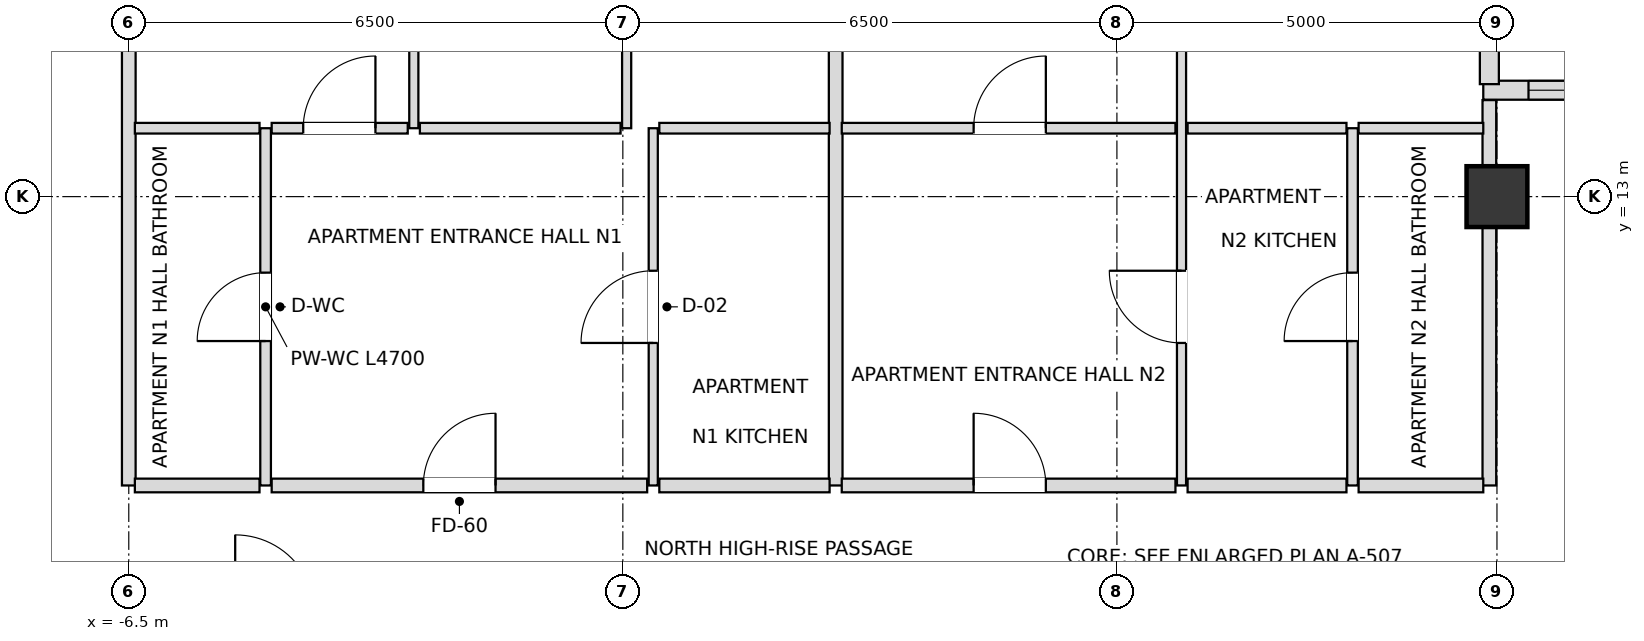
"""IFC4 building model, lengths in metres.
Left out: names, types, materials, properties, quantities, classifications, styles, units other than length and angle.
Written with IfcOpenShell. Run it as: python <this file> out.ifc"""

import sys

from ifc_helpers import new_model, si_unit, direction, frame, frame_2d, origin, origin_2d, place, context, subcontext, project, spatial, rectangle, extrude, element, fill, save


model = new_model("IFC4")
c1 = context("Model", 3, precision=1e-05, world=origin(), true_north=direction((0.0, 1.0)))
c2 = subcontext(c1, "Body", "Model", "MODEL_VIEW")
j1 = project(units=[si_unit("LENGTHUNIT", "METRE"), si_unit("PLANEANGLEUNIT", "RADIAN")], contexts=[c1])
p1 = place(None, origin())
s1 = spatial("IfcSite", under=j1, at=p1, CompositionType="ELEMENT")
p2 = place(p1, origin())
s2 = spatial("IfcBuilding", under=s1, at=p2, CompositionType="ELEMENT")
p3 = place(p2, frame((0.0, 0.0, 236.7)))
s3 = spatial("IfcBuildingStorey", under=s2, at=p3, CompositionType="ELEMENT", Elevation=236.7)
p4 = place(p3, frame((11.5, 13.0, 0.0), z_axis=(0.0, 0.0, 1.0), x_axis=(1.0, 0.0, 0.0)))
e1 = element("IfcColumn", 1, at=p4, inside=s3, PredefinedType="COLUMN", context=c2, shape_type="SweptSolid", body=[
    extrude(rectangle(XDim=0.8, YDim=0.8, at=origin_2d()), origin(), (0.0, 0.0, 1.0), 3.6),
])
p5 = place(p3, frame((16.98, 14.4, 0.0), z_axis=(0.0, 0.0, 1.0), x_axis=(-1.0, 0.0, 0.0)))
e2 = element("IfcWall", 2, at=p5, inside=s3, PredefinedType="SOLIDWALL", context=c2, shape_type="SweptSolid", body=[
    extrude(rectangle(XDim=5.66, YDim=0.25, at=frame_2d((2.83, 0.0))), origin(), (0.0, 0.0, 1.0), 2.748),
])
p6 = place(p5, frame((0.595, 0.0, 0.72)))
e3 = element("IfcOpeningElement", 3, at=p6, cuts=e2, PredefinedType="OPENING", context=c2, shape_type="SweptSolid", body=[
    extrude(rectangle(XDim=1.8, YDim=1.68, at=frame_2d((0.9, 0.84))), frame((0.0, 0.135, 0.0), z_axis=(0.0, -1.0, 0.0), x_axis=(1.0, 0.0, 0.0)), (0.0, 0.0, 1.0), 0.27),
])
p7 = place(p5, frame((3.265, 0.0, 0.72)))
e4 = element("IfcOpeningElement", 4, at=p7, cuts=e2, PredefinedType="OPENING", context=c2, shape_type="SweptSolid", body=[
    extrude(rectangle(XDim=1.8, YDim=1.68, at=frame_2d((0.9, 0.84))), frame((0.0, 0.135, 0.0), z_axis=(0.0, -1.0, 0.0), x_axis=(1.0, 0.0, 0.0)), (0.0, 0.0, 1.0), 0.27),
])
p8 = place(p3, frame((11.4, 14.48, 0.0), z_axis=(0.0, 0.0, 1.0), x_axis=(0.0, 1.0, 0.0)))
e5 = element("IfcWall", 5, at=p8, inside=s3, PredefinedType="SOLIDWALL", context=c2, shape_type="SweptSolid", body=[
    extrude(rectangle(XDim=5.34, YDim=0.25, at=frame_2d((2.67, 0.0))), origin(), (0.0, 0.0, 1.0), 2.748),
])
p9 = place(p8, frame((1.615, 0.0, 0.72)))
e6 = element("IfcOpeningElement", 6, at=p9, cuts=e5, PredefinedType="OPENING", context=c2, shape_type="SweptSolid", body=[
    extrude(rectangle(XDim=1.8, YDim=1.68, at=frame_2d((0.9, 0.84))), frame((0.0, 0.135, 0.0), z_axis=(0.0, -1.0, 0.0), x_axis=(1.0, 0.0, 0.0)), (0.0, 0.0, 1.0), 0.27),
])
p10 = place(p3, frame((-6.5, 9.2, 0.0), z_axis=(0.0, 0.0, 1.0), x_axis=(0.0, 1.0, 0.0)))
e7 = element("IfcWall", 7, at=p10, inside=s3, PredefinedType="PARTITIONING", context=c2, shape_type="SweptSolid", body=[
    extrude(rectangle(XDim=10.7, YDim=0.18, at=frame_2d((5.35, 0.0))), origin(), (0.0, 0.0, 1.0), 2.826),
])
p11 = place(p3, frame((-4.7, 9.2, 0.0), z_axis=(0.0, 0.0, 1.0), x_axis=(0.0, 1.0, 0.0)))
e8 = element("IfcWall", 8, at=p11, inside=s3, PredefinedType="PARTITIONING", context=c2, shape_type="SweptSolid", body=[
    extrude(rectangle(XDim=4.7, YDim=0.14, at=frame_2d((2.35, 0.0))), origin(), (0.0, 0.0, 1.0), 3.38),
])
p12 = place(p11, frame((1.9, 0.0, 0.0)))
e9 = element("IfcOpeningElement", 9, at=p12, cuts=e8, PredefinedType="OPENING", context=c2, shape_type="SweptSolid", body=[
    extrude(rectangle(XDim=0.9, YDim=2.1, at=frame_2d((0.45, 1.05))), frame((0.0, 0.08, 0.0), z_axis=(0.0, -1.0, 0.0), x_axis=(1.0, 0.0, 0.0)), (0.0, 0.0, 1.0), 0.16),
])
p13 = place(p3, frame((-2.75, 13.9, 0.0), z_axis=(0.0, 0.0, 1.0), x_axis=(0.0, 1.0, 0.0)))
e10 = element("IfcWall", 10, at=p13, inside=s3, PredefinedType="PARTITIONING", context=c2, shape_type="SweptSolid", body=[
    extrude(rectangle(XDim=6.0, YDim=0.12, at=frame_2d((3.0, 0.0))), origin(), (0.0, 0.0, 1.0), 3.018),
])
p14 = place(p13, frame((2.55, 0.0, 0.0)))
e11 = element("IfcOpeningElement", 11, at=p14, cuts=e10, PredefinedType="OPENING", context=c2, shape_type="SweptSolid", body=[
    extrude(rectangle(XDim=0.9, YDim=2.1, at=frame_2d((0.45, 1.05))), frame((0.0, 0.07, 0.0), z_axis=(0.0, -1.0, 0.0), x_axis=(1.0, 0.0, 0.0)), (0.0, 0.0, 1.0), 0.14),
])
p15 = place(p3, frame((0.05, 13.9, 0.0), z_axis=(0.0, 0.0, 1.0), x_axis=(0.0, 1.0, 0.0)))
e12 = element("IfcWall", 12, at=p15, inside=s3, PredefinedType="PARTITIONING", context=c2, shape_type="SweptSolid", body=[
    extrude(rectangle(XDim=6.0, YDim=0.12, at=frame_2d((3.0, 0.0))), origin(), (0.0, 0.0, 1.0), 3.018),
])
p16 = place(p15, frame((2.55, 0.0, 0.0)))
e13 = element("IfcOpeningElement", 13, at=p16, cuts=e12, PredefinedType="OPENING", context=c2, shape_type="SweptSolid", body=[
    extrude(rectangle(XDim=0.9, YDim=2.1, at=frame_2d((0.45, 1.05))), frame((0.0, 0.07, 0.0), z_axis=(0.0, -1.0, 0.0), x_axis=(1.0, 0.0, 0.0)), (0.0, 0.0, 1.0), 0.14),
])
p17 = place(p3, frame((0.4, 9.2, 0.0), z_axis=(0.0, 0.0, 1.0), x_axis=(0.0, 1.0, 0.0)))
e14 = element("IfcWall", 14, at=p17, inside=s3, PredefinedType="PARTITIONING", context=c2, shape_type="SweptSolid", body=[
    extrude(rectangle(XDim=4.7, YDim=0.12, at=frame_2d((2.35, 0.0))), origin(), (0.0, 0.0, 1.0), 3.38),
])
p18 = place(p17, frame((1.875, 0.0, 0.0)))
e15 = element("IfcOpeningElement", 15, at=p18, cuts=e14, PredefinedType="OPENING", context=c2, shape_type="SweptSolid", body=[
    extrude(rectangle(XDim=0.95, YDim=2.1, at=frame_2d((0.475, 1.05))), frame((0.0, 0.07, 0.0), z_axis=(0.0, -1.0, 0.0), x_axis=(1.0, 0.0, 0.0)), (0.0, 0.0, 1.0), 0.14),
])
p19 = place(p3, frame((2.8, 9.2, 0.0), z_axis=(0.0, 0.0, 1.0), x_axis=(0.0, 1.0, 0.0)))
e16 = element("IfcWall", 16, at=p19, inside=s3, PredefinedType="PARTITIONING", context=c2, shape_type="SweptSolid", body=[
    extrude(rectangle(XDim=10.7, YDim=0.18, at=frame_2d((5.35, 0.0))), origin(), (0.0, 0.0, 1.0), 3.018),
])
p20 = place(p3, frame((7.35, 9.2, 0.0), z_axis=(0.0, 0.0, 1.0), x_axis=(0.0, 1.0, 0.0)))
e17 = element("IfcWall", 17, at=p20, inside=s3, PredefinedType="PARTITIONING", context=c2, shape_type="SweptSolid", body=[
    extrude(rectangle(XDim=10.7, YDim=0.12, at=frame_2d((5.35, 0.0))), origin(), (0.0, 0.0, 1.0), 2.826),
])
p21 = place(p20, frame((1.875, 0.0, 0.0)))
e18 = element("IfcOpeningElement", 18, at=p21, cuts=e17, PredefinedType="OPENING", context=c2, shape_type="SweptSolid", body=[
    extrude(rectangle(XDim=0.95, YDim=2.1, at=frame_2d((0.475, 1.05))), frame((0.0, 0.07, 0.0), z_axis=(0.0, -1.0, 0.0), x_axis=(1.0, 0.0, 0.0)), (0.0, 0.0, 1.0), 0.14),
])
p22 = place(p20, frame((7.25, 0.0, 0.0)))
e19 = element("IfcOpeningElement", 19, at=p22, cuts=e17, PredefinedType="OPENING", context=c2, shape_type="SweptSolid", body=[
    extrude(rectangle(XDim=0.9, YDim=2.1, at=frame_2d((0.45, 1.05))), frame((0.0, 0.07, 0.0), z_axis=(0.0, -1.0, 0.0), x_axis=(1.0, 0.0, 0.0)), (0.0, 0.0, 1.0), 0.14),
])
p23 = place(p3, frame((9.6, 9.2, 0.0), z_axis=(0.0, 0.0, 1.0), x_axis=(0.0, 1.0, 0.0)))
e20 = element("IfcWall", 20, at=p23, inside=s3, PredefinedType="PARTITIONING", context=c2, shape_type="SweptSolid", body=[
    extrude(rectangle(XDim=4.7, YDim=0.14, at=frame_2d((2.35, 0.0))), origin(), (0.0, 0.0, 1.0), 2.826),
])
p24 = place(p23, frame((1.9, 0.0, 0.0)))
e21 = element("IfcOpeningElement", 21, at=p24, cuts=e20, PredefinedType="OPENING", context=c2, shape_type="SweptSolid", body=[
    extrude(rectangle(XDim=0.9, YDim=2.1, at=frame_2d((0.45, 1.05))), frame((0.0, 0.08, 0.0), z_axis=(0.0, -1.0, 0.0), x_axis=(1.0, 0.0, 0.0)), (0.0, 0.0, 1.0), 0.16),
])
p25 = place(p3, frame((11.4, 9.2, 0.0), z_axis=(0.0, 0.0, 1.0), x_axis=(0.0, 1.0, 0.0)))
e22 = element("IfcWall", 22, at=p25, inside=s3, PredefinedType="PARTITIONING", context=c2, shape_type="SweptSolid", body=[
    extrude(rectangle(XDim=5.07, YDim=0.18, at=frame_2d((2.535, 0.0))), origin(), (0.0, 0.0, 1.0), 2.748),
])
p26 = place(p3, frame((-6.42, 9.2, 0.0), z_axis=(0.0, 0.0, 1.0), x_axis=(1.0, 0.0, 0.0)))
e23 = element("IfcWall", 23, at=p26, inside=s3, PredefinedType="PARTITIONING", context=c2, shape_type="SweptSolid", body=[
    extrude(rectangle(XDim=1.64, YDim=0.18, at=frame_2d((0.82, 0.0))), origin(), (0.0, 0.0, 1.0), 3.38),
])
p27 = place(p3, frame((-4.62, 9.2, 0.0), z_axis=(0.0, 0.0, 1.0), x_axis=(1.0, 0.0, 0.0)))
e24 = element("IfcWall", 24, at=p27, inside=s3, PredefinedType="PARTITIONING", context=c2, shape_type="SweptSolid", body=[
    extrude(rectangle(XDim=4.94, YDim=0.18, at=frame_2d((2.47, 0.0))), origin(), (0.0, 0.0, 1.0), 3.38),
])
p28 = place(p27, frame((1.995, 0.0, 0.0)))
e25 = element("IfcOpeningElement", 25, at=p28, cuts=e24, PredefinedType="OPENING", context=c2, shape_type="SweptSolid", body=[
    extrude(rectangle(XDim=0.95, YDim=2.15, at=frame_2d((0.475, 1.075))), frame((0.0, 0.1, 0.0), z_axis=(0.0, -1.0, 0.0), x_axis=(1.0, 0.0, 0.0)), (0.0, 0.0, 1.0), 0.2),
])
p29 = place(p3, frame((0.48, 9.2, 0.0), z_axis=(0.0, 0.0, 1.0), x_axis=(1.0, 0.0, 0.0)))
e26 = element("IfcWall", 26, at=p29, inside=s3, PredefinedType="PARTITIONING", context=c2, shape_type="SweptSolid", body=[
    extrude(rectangle(XDim=2.24, YDim=0.18, at=frame_2d((1.12, 0.0))), origin(), (0.0, 0.0, 1.0), 3.38),
])
p30 = place(p3, frame((2.88, 9.2, 0.0), z_axis=(0.0, 0.0, 1.0), x_axis=(1.0, 0.0, 0.0)))
e27 = element("IfcWall", 27, at=p30, inside=s3, PredefinedType="PARTITIONING", context=c2, shape_type="SweptSolid", body=[
    extrude(rectangle(XDim=4.39, YDim=0.18, at=frame_2d((2.195, 0.0))), origin(), (0.0, 0.0, 1.0), 2.826),
])
p31 = place(p30, frame((1.735, 0.0, 0.0)))
e28 = element("IfcOpeningElement", 28, at=p31, cuts=e27, PredefinedType="OPENING", context=c2, shape_type="SweptSolid", body=[
    extrude(rectangle(XDim=0.95, YDim=2.15, at=frame_2d((0.475, 1.075))), frame((0.0, 0.1, 0.0), z_axis=(0.0, -1.0, 0.0), x_axis=(1.0, 0.0, 0.0)), (0.0, 0.0, 1.0), 0.2),
])
p32 = place(p3, frame((7.43, 9.2, 0.0), z_axis=(0.0, 0.0, 1.0), x_axis=(1.0, 0.0, 0.0)))
e29 = element("IfcWall", 29, at=p32, inside=s3, PredefinedType="PARTITIONING", context=c2, shape_type="SweptSolid", body=[
    extrude(rectangle(XDim=2.09, YDim=0.18, at=frame_2d((1.045, 0.0))), origin(), (0.0, 0.0, 1.0), 3.38),
])
p33 = place(p3, frame((9.68, 9.2, 0.0), z_axis=(0.0, 0.0, 1.0), x_axis=(1.0, 0.0, 0.0)))
e30 = element("IfcWall", 30, at=p33, inside=s3, PredefinedType="PARTITIONING", context=c2, shape_type="SweptSolid", body=[
    extrude(rectangle(XDim=1.64, YDim=0.18, at=frame_2d((0.82, 0.0))), origin(), (0.0, 0.0, 1.0), 3.38),
])
p34 = place(p3, frame((-6.42, 13.9, 0.0), z_axis=(0.0, 0.0, 1.0), x_axis=(1.0, 0.0, 0.0)))
e31 = element("IfcWall", 31, at=p34, inside=s3, PredefinedType="PARTITIONING", context=c2, shape_type="SweptSolid", body=[
    extrude(rectangle(XDim=1.64, YDim=0.14, at=frame_2d((0.82, 0.0))), origin(), (0.0, 0.0, 1.0), 3.38),
])
p35 = place(p3, frame((-4.62, 13.9, 0.0), z_axis=(0.0, 0.0, 1.0), x_axis=(1.0, 0.0, 0.0)))
e32 = element("IfcWall", 32, at=p35, inside=s3, PredefinedType="PARTITIONING", context=c2, shape_type="SweptSolid", body=[
    extrude(rectangle(XDim=1.79, YDim=0.14, at=frame_2d((0.895, 0.0))), origin(), (0.0, 0.0, 1.0), 3.38),
])
p36 = place(p35, frame((0.415, 0.0, 0.0)))
e33 = element("IfcOpeningElement", 33, at=p36, cuts=e32, PredefinedType="OPENING", context=c2, shape_type="SweptSolid", body=[
    extrude(rectangle(XDim=0.95, YDim=2.1, at=frame_2d((0.475, 1.05))), frame((0.0, 0.08, 0.0), z_axis=(0.0, -1.0, 0.0), x_axis=(1.0, 0.0, 0.0)), (0.0, 0.0, 1.0), 0.16),
])
p37 = place(p3, frame((-2.67, 13.9, 0.0), z_axis=(0.0, 0.0, 1.0), x_axis=(1.0, 0.0, 0.0)))
e34 = element("IfcWall", 34, at=p37, inside=s3, PredefinedType="PARTITIONING", context=c2, shape_type="SweptSolid", body=[
    extrude(rectangle(XDim=2.64, YDim=0.14, at=frame_2d((1.32, 0.0))), origin(), (0.0, 0.0, 1.0), 3.38),
])
p38 = place(p3, frame((0.48, 13.9, 0.0), z_axis=(0.0, 0.0, 1.0), x_axis=(1.0, 0.0, 0.0)))
e35 = element("IfcWall", 35, at=p38, inside=s3, PredefinedType="PARTITIONING", context=c2, shape_type="SweptSolid", body=[
    extrude(rectangle(XDim=2.24, YDim=0.14, at=frame_2d((1.12, 0.0))), origin(), (0.0, 0.0, 1.0), 3.38),
])
p39 = place(p3, frame((2.88, 13.9, 0.0), z_axis=(0.0, 0.0, 1.0), x_axis=(1.0, 0.0, 0.0)))
e36 = element("IfcWall", 36, at=p39, inside=s3, PredefinedType="PARTITIONING", context=c2, shape_type="SweptSolid", body=[
    extrude(rectangle(XDim=4.39, YDim=0.14, at=frame_2d((2.195, 0.0))), origin(), (0.0, 0.0, 1.0), 2.826),
])
p40 = place(p39, frame((1.735, 0.0, 0.0)))
e37 = element("IfcOpeningElement", 37, at=p40, cuts=e36, PredefinedType="OPENING", context=c2, shape_type="SweptSolid", body=[
    extrude(rectangle(XDim=0.95, YDim=2.1, at=frame_2d((0.475, 1.05))), frame((0.0, 0.08, 0.0), z_axis=(0.0, -1.0, 0.0), x_axis=(1.0, 0.0, 0.0)), (0.0, 0.0, 1.0), 0.16),
])
p41 = place(p3, frame((7.43, 13.9, 0.0), z_axis=(0.0, 0.0, 1.0), x_axis=(1.0, 0.0, 0.0)))
e38 = element("IfcWall", 38, at=p41, inside=s3, PredefinedType="PARTITIONING", context=c2, shape_type="SweptSolid", body=[
    extrude(rectangle(XDim=2.09, YDim=0.14, at=frame_2d((1.045, 0.0))), origin(), (0.0, 0.0, 1.0), 3.38),
])
p42 = place(p3, frame((9.68, 13.9, 0.0), z_axis=(0.0, 0.0, 1.0), x_axis=(1.0, 0.0, 0.0)))
e39 = element("IfcWall", 39, at=p42, inside=s3, PredefinedType="PARTITIONING", context=c2, shape_type="SweptSolid", body=[
    extrude(rectangle(XDim=1.64, YDim=0.14, at=frame_2d((0.82, 0.0))), origin(), (0.0, 0.0, 1.0), 3.38),
])
p43 = place(p7, origin())
e40 = element("IfcWindow", 40, at=p43, inside=s3, PartitioningType="SINGLE_PANEL", PredefinedType="WINDOW", context=c2, shape_type="SweptSolid", body=[
    extrude(rectangle(XDim=1.8, YDim=1.68, at=frame_2d((0.9, 0.84))), frame((0.0, 0.03, 0.0), z_axis=(0.0, -1.0, 0.0), x_axis=(1.0, 0.0, 0.0)), (0.0, 0.0, 1.0), 0.06),
])
fill(e4, e40)
p44 = place(p12, origin())
e41 = element("IfcDoor", 41, at=p44, inside=s3, OperationType="SINGLE_SWING_LEFT", PredefinedType="DOOR", context=c2, shape_type="SweptSolid", body=[
    extrude(rectangle(XDim=0.9, YDim=2.1, at=frame_2d((0.45, 1.05))), frame((0.0, 0.025, 0.0), z_axis=(0.0, -1.0, 0.0), x_axis=(1.0, 0.0, 0.0)), (0.0, 0.0, 1.0), 0.05),
])
fill(e9, e41)
p45 = place(p28, origin())
e42 = element("IfcDoor", 42, at=p45, inside=s3, OperationType="SINGLE_SWING_RIGHT", PredefinedType="DOOR", context=c2, shape_type="SweptSolid", body=[
    extrude(rectangle(XDim=0.95, YDim=2.15, at=frame_2d((0.475, 1.075))), frame((0.0, 0.025, 0.0), z_axis=(0.0, -1.0, 0.0), x_axis=(1.0, 0.0, 0.0)), (0.0, 0.0, 1.0), 0.05),
])
fill(e25, e42)
p46 = place(p18, origin())
e43 = element("IfcDoor", 43, at=p46, inside=s3, OperationType="SINGLE_SWING_LEFT", PredefinedType="DOOR", context=c2, shape_type="SweptSolid", body=[
    extrude(rectangle(XDim=0.95, YDim=2.1, at=frame_2d((0.475, 1.05))), frame((0.0, 0.025, 0.0), z_axis=(0.0, -1.0, 0.0), x_axis=(1.0, 0.0, 0.0)), (0.0, 0.0, 1.0), 0.05),
])
fill(e15, e43)
p47 = place(p36, origin())
e44 = element("IfcDoor", 44, at=p47, inside=s3, OperationType="SINGLE_SWING_RIGHT", PredefinedType="DOOR", context=c2, shape_type="SweptSolid", body=[
    extrude(rectangle(XDim=0.95, YDim=2.1, at=frame_2d((0.475, 1.05))), frame((0.0, 0.025, 0.0), z_axis=(0.0, -1.0, 0.0), x_axis=(1.0, 0.0, 0.0)), (0.0, 0.0, 1.0), 0.05),
])
fill(e33, e44)
p48 = place(p31, origin())
e45 = element("IfcDoor", 45, at=p48, inside=s3, OperationType="SINGLE_SWING_LEFT", PredefinedType="DOOR", context=c2, shape_type="SweptSolid", body=[
    extrude(rectangle(XDim=0.95, YDim=2.15, at=frame_2d((0.475, 1.075))), frame((0.0, 0.025, 0.0), z_axis=(0.0, -1.0, 0.0), x_axis=(1.0, 0.0, 0.0)), (0.0, 0.0, 1.0), 0.05),
])
fill(e28, e45)
p49 = place(p21, origin())
e46 = element("IfcDoor", 46, at=p49, inside=s3, OperationType="SINGLE_SWING_RIGHT", PredefinedType="DOOR", context=c2, shape_type="SweptSolid", body=[
    extrude(rectangle(XDim=0.95, YDim=2.1, at=frame_2d((0.475, 1.05))), frame((0.0, 0.025, 0.0), z_axis=(0.0, -1.0, 0.0), x_axis=(1.0, 0.0, 0.0)), (0.0, 0.0, 1.0), 0.05),
])
fill(e18, e46)
p50 = place(p24, origin())
e47 = element("IfcDoor", 47, at=p50, inside=s3, OperationType="SINGLE_SWING_LEFT", PredefinedType="DOOR", context=c2, shape_type="SweptSolid", body=[
    extrude(rectangle(XDim=0.9, YDim=2.1, at=frame_2d((0.45, 1.05))), frame((0.0, 0.025, 0.0), z_axis=(0.0, -1.0, 0.0), x_axis=(1.0, 0.0, 0.0)), (0.0, 0.0, 1.0), 0.05),
])
fill(e21, e47)
p51 = place(p40, origin())
e48 = element("IfcDoor", 48, at=p51, inside=s3, OperationType="SINGLE_SWING_RIGHT", PredefinedType="DOOR", context=c2, shape_type="SweptSolid", body=[
    extrude(rectangle(XDim=0.95, YDim=2.1, at=frame_2d((0.475, 1.05))), frame((0.0, 0.025, 0.0), z_axis=(0.0, -1.0, 0.0), x_axis=(1.0, 0.0, 0.0)), (0.0, 0.0, 1.0), 0.05),
])
fill(e37, e48)
save(model, sys.argv[1])
